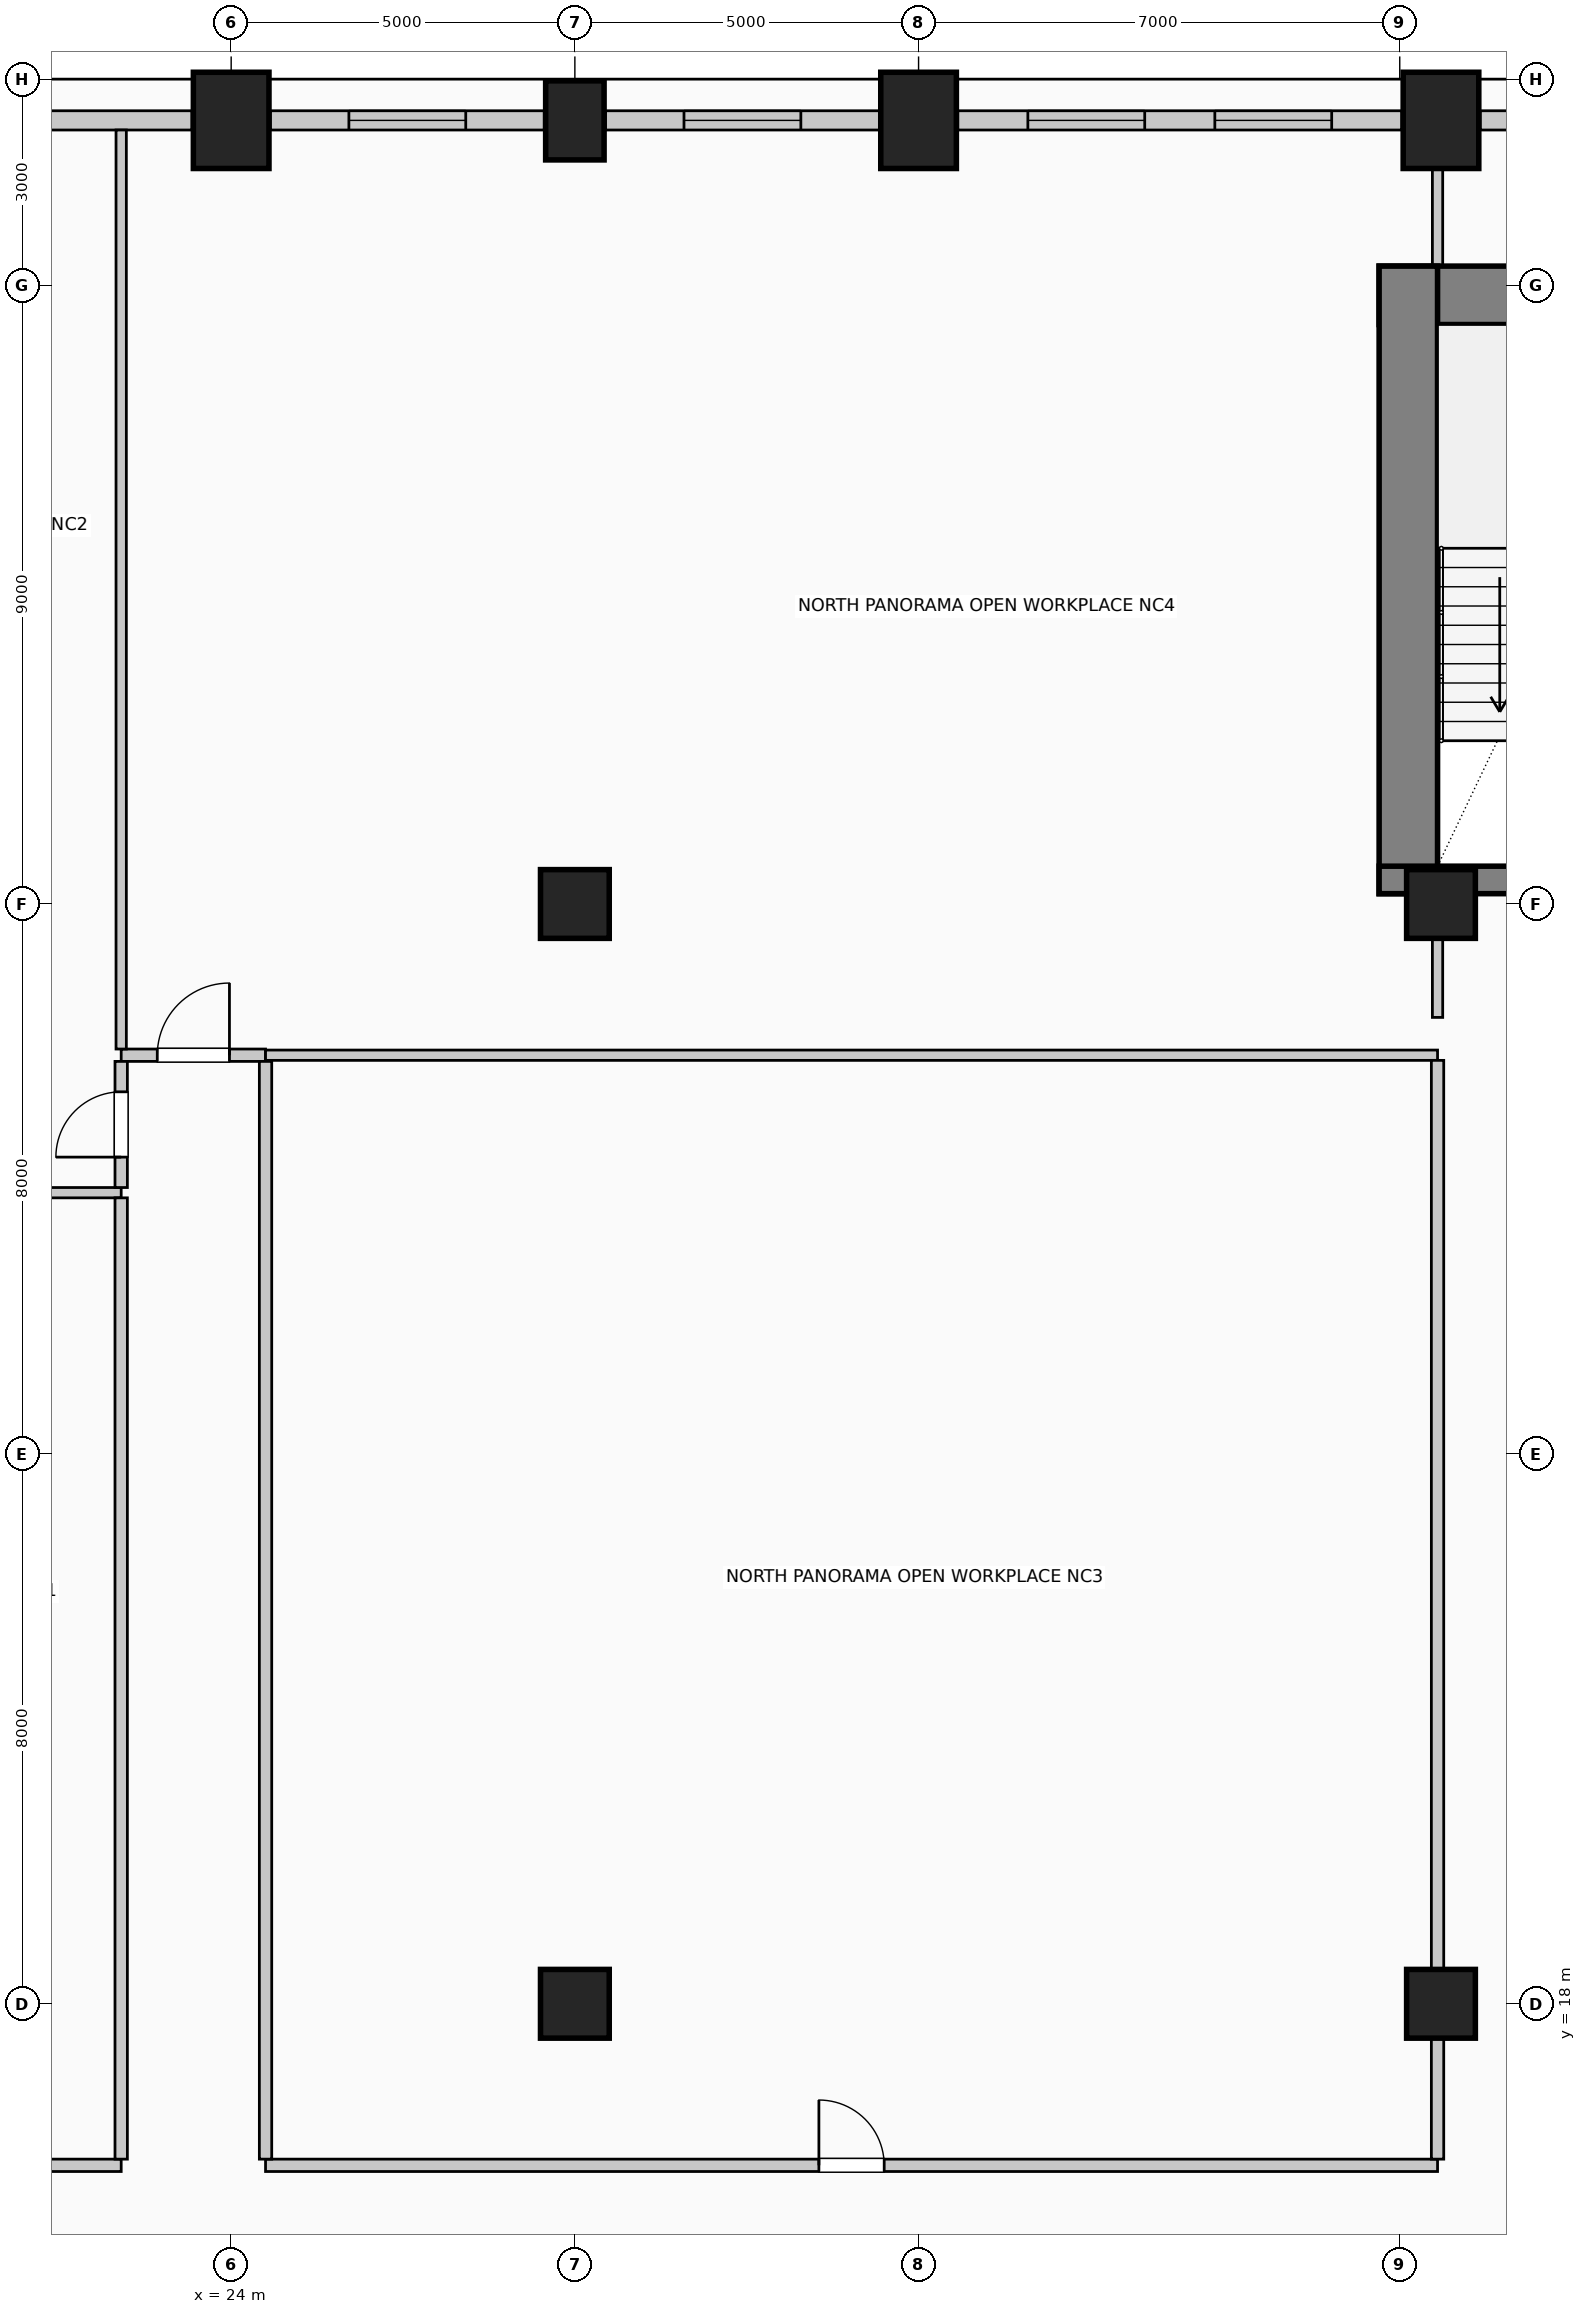
"""IFC4 building model, lengths in metres.
Left out: names, types, materials, properties, quantities, classifications, styles, units other than length and angle.
Written with IfcOpenShell. Run it as: python <this file> out.ifc"""

import sys

from ifc_helpers import new_model, si_unit, direction, frame, frame_2d, origin, origin_2d, place, context, subcontext, project, spatial, rectangle, circle, extrude, element, fill, save


model = new_model("IFC4")
c1 = context("Model", 3, precision=1e-05, world=origin(), true_north=direction((0.0, 1.0)))
c2 = subcontext(c1, "Body", "Model", "MODEL_VIEW")
j1 = project(units=[si_unit("LENGTHUNIT", "METRE"), si_unit("PLANEANGLEUNIT", "RADIAN")], contexts=[c1])
p1 = place(None, origin())
s1 = spatial("IfcSite", under=j1, at=p1, CompositionType="ELEMENT")
p2 = place(p1, origin())
s2 = spatial("IfcBuilding", under=s1, at=p2, CompositionType="ELEMENT")
p3 = place(p2, frame((0.0, 0.0, 136.6)))
s3 = spatial("IfcBuildingStorey", under=s2, at=p3, CompositionType="ELEMENT", Elevation=136.6)
p4 = place(p3, frame((40.7, 42.855, 0.0), z_axis=(0.0, 0.0, 1.0), x_axis=(1.0, 0.0, 0.0)))
e1 = element("IfcWall", 1, at=p4, inside=s3, PredefinedType="SHEAR", context=c2, shape_type="SweptSolid", body=[
    extrude(rectangle(XDim=14.6, YDim=0.85, at=frame_2d((7.3, 0.0))), origin(), (0.0, 0.0, 1.0), 4.0),
])
p5 = place(p3, frame((41.125, 34.15, 0.0), z_axis=(0.0, 0.0, 1.0), x_axis=(0.0, 1.0, 0.0)))
e2 = element("IfcWall", 2, at=p5, inside=s3, PredefinedType="SHEAR", context=c2, shape_type="SweptSolid", body=[
    extrude(rectangle(XDim=9.13, YDim=0.85, at=frame_2d((4.565, 0.0))), origin(), (0.0, 0.0, 1.0), 4.0),
])
p6 = place(p3, frame((40.7, 34.35, 0.0), z_axis=(0.0, 0.0, 1.0), x_axis=(1.0, 0.0, 0.0)))
e3 = element("IfcWall", 3, at=p6, inside=s3, PredefinedType="SHEAR", context=c2, shape_type="SweptSolid", body=[
    extrude(rectangle(XDim=5.01, YDim=0.4, at=frame_2d((2.505, 0.0))), origin(), (0.0, 0.0, 1.0), 4.0),
])
p7 = place(p6, frame((2.4, 0.0, 0.0)))
e4 = element("IfcOpeningElement", 4, at=p7, cuts=e3, PredefinedType="OPENING", context=c2, shape_type="SweptSolid", body=[
    extrude(rectangle(XDim=1.15, YDim=2.2, at=frame_2d((0.575, 1.1))), frame((0.0, 0.21, 0.0), z_axis=(0.0, -1.0, 0.0), x_axis=(1.0, 0.0, 0.0)), (0.0, 0.0, 1.0), 0.42),
])
p8 = place(p3, frame((24.0, 45.4, 0.0), z_axis=(0.0, 0.0, 1.0), x_axis=(1.0, 0.0, 0.0)))
e5 = element("IfcColumn", 5, at=p8, inside=s3, PredefinedType="COLUMN", context=c2, shape_type="SweptSolid", body=[
    extrude(rectangle(XDim=1.1, YDim=1.4, at=origin_2d()), origin(), (0.0, 0.0, 1.0), 4.0),
])
p9 = place(p3, frame((29.0, 45.4, 0.0), z_axis=(0.0, 0.0, 1.0), x_axis=(1.0, 0.0, 0.0)))
e6 = element("IfcColumn", 6, at=p9, inside=s3, PredefinedType="COLUMN", context=c2, shape_type="SweptSolid", body=[
    extrude(rectangle(XDim=0.85, YDim=1.15, at=origin_2d()), origin(), (0.0, 0.0, 1.0), 4.0),
])
for number, where, z_axis, x_axis in (
    (7, (34.0, 45.4, 0.0), (0.0, 0.0, 1.0), (1.0, 0.0, 0.0)),
    (8, (41.6, 45.4, 0.0), (0.0, 0.0, 1.0), (1.0, 0.0, 0.0)),
):
    element("IfcColumn", number, at=place(p3, frame(where, z_axis=z_axis, x_axis=x_axis)), inside=s3, PredefinedType="COLUMN", context=c2, shape_type="SweptSolid", body=[
        extrude(rectangle(XDim=1.1, YDim=1.4, at=origin_2d()), origin(), (0.0, 0.0, 1.0), 4.0),
    ])
for number, where, z_axis, x_axis in (
    (9, (29.0, 18.0, 0.0), (0.0, 0.0, 1.0), (1.0, 0.0, 0.0)),
    (10, (29.0, 34.0, 0.0), (0.0, 0.0, 1.0), (1.0, 0.0, 0.0)),
    (11, (41.6, 18.0, 0.0), (0.0, 0.0, 1.0), (1.0, 0.0, 0.0)),
    (12, (41.6, 34.0, 0.0), (0.0, 0.0, 1.0), (1.0, 0.0, 0.0)),
):
    element("IfcColumn", number, at=place(p3, frame(where, z_axis=z_axis, x_axis=x_axis)), inside=s3, PredefinedType="COLUMN", context=c2, shape_type="SweptSolid", body=[
        extrude(circle(Radius=0.5, at=origin_2d()), origin(), (0.0, 0.0, 1.0), 4.0),
    ])
p10 = place(p3, frame((16.97, 45.4, 0.0), z_axis=(0.0, 0.0, 1.0), x_axis=(1.0, 0.0, 0.0)))
e13 = element("IfcWall", 13, at=p10, inside=s3, PredefinedType="SOLIDWALL", context=c2, shape_type="SweptSolid", body=[
    extrude(rectangle(XDim=6.46, YDim=0.28, at=frame_2d((3.23, 0.0))), origin(), (0.0, 0.0, 1.0), 2.875),
])
p11 = place(p10, frame((1.02, 0.0, 0.5)))
e14 = element("IfcOpeningElement", 14, at=p11, cuts=e13, PredefinedType="OPENING", context=c2, shape_type="SweptSolid", body=[
    extrude(rectangle(XDim=1.7, YDim=1.95, at=frame_2d((0.85, 0.975))), frame((0.0, 0.15, 0.0), z_axis=(0.0, -1.0, 0.0), x_axis=(1.0, 0.0, 0.0)), (0.0, 0.0, 1.0), 0.3),
])
p12 = place(p3, frame((24.57, 45.4, 0.0), z_axis=(0.0, 0.0, 1.0), x_axis=(1.0, 0.0, 0.0)))
e15 = element("IfcWall", 15, at=p12, inside=s3, PredefinedType="SOLIDWALL", context=c2, shape_type="SweptSolid", body=[
    extrude(rectangle(XDim=3.985, YDim=0.28, at=frame_2d((1.992, 0.0))), origin(), (0.0, 0.0, 1.0), 2.875),
])
p13 = place(p12, frame((1.143, 0.0, 0.5)))
e16 = element("IfcOpeningElement", 16, at=p13, cuts=e15, PredefinedType="OPENING", context=c2, shape_type="SweptSolid", body=[
    extrude(rectangle(XDim=1.7, YDim=1.95, at=frame_2d((0.85, 0.975))), frame((0.0, 0.15, 0.0), z_axis=(0.0, -1.0, 0.0), x_axis=(1.0, 0.0, 0.0)), (0.0, 0.0, 1.0), 0.3),
])
p14 = place(p3, frame((29.445, 45.4, 0.0), z_axis=(0.0, 0.0, 1.0), x_axis=(1.0, 0.0, 0.0)))
e17 = element("IfcWall", 17, at=p14, inside=s3, PredefinedType="SOLIDWALL", context=c2, shape_type="SweptSolid", body=[
    extrude(rectangle(XDim=3.985, YDim=0.28, at=frame_2d((1.992, 0.0))), origin(), (0.0, 0.0, 1.0), 2.875),
])
p15 = place(p14, frame((1.143, 0.0, 0.5)))
e18 = element("IfcOpeningElement", 18, at=p15, cuts=e17, PredefinedType="OPENING", context=c2, shape_type="SweptSolid", body=[
    extrude(rectangle(XDim=1.7, YDim=1.95, at=frame_2d((0.85, 0.975))), frame((0.0, 0.15, 0.0), z_axis=(0.0, -1.0, 0.0), x_axis=(1.0, 0.0, 0.0)), (0.0, 0.0, 1.0), 0.3),
])
p16 = place(p3, frame((34.57, 45.4, 0.0), z_axis=(0.0, 0.0, 1.0), x_axis=(1.0, 0.0, 0.0)))
e19 = element("IfcWall", 19, at=p16, inside=s3, PredefinedType="SOLIDWALL", context=c2, shape_type="SweptSolid", body=[
    extrude(rectangle(XDim=6.46, YDim=0.28, at=frame_2d((3.23, 0.0))), origin(), (0.0, 0.0, 1.0), 2.875),
])
p17 = place(p16, frame((1.02, 0.0, 0.5)))
e20 = element("IfcOpeningElement", 20, at=p17, cuts=e19, PredefinedType="OPENING", context=c2, shape_type="SweptSolid", body=[
    extrude(rectangle(XDim=1.7, YDim=1.95, at=frame_2d((0.85, 0.975))), frame((0.0, 0.15, 0.0), z_axis=(0.0, -1.0, 0.0), x_axis=(1.0, 0.0, 0.0)), (0.0, 0.0, 1.0), 0.3),
])
p18 = place(p16, frame((3.74, 0.0, 0.5)))
e21 = element("IfcOpeningElement", 21, at=p18, cuts=e19, PredefinedType="OPENING", context=c2, shape_type="SweptSolid", body=[
    extrude(rectangle(XDim=1.7, YDim=1.95, at=frame_2d((0.85, 0.975))), frame((0.0, 0.15, 0.0), z_axis=(0.0, -1.0, 0.0), x_axis=(1.0, 0.0, 0.0)), (0.0, 0.0, 1.0), 0.3),
])
p19 = place(p3, frame((42.17, 45.4, 0.0), z_axis=(0.0, 0.0, 1.0), x_axis=(1.0, 0.0, 0.0)))
e22 = element("IfcWall", 22, at=p19, inside=s3, PredefinedType="SOLIDWALL", context=c2, shape_type="SweptSolid", body=[
    extrude(rectangle(XDim=1.385, YDim=0.28, at=frame_2d((0.692, 0.0))), origin(), (0.0, 0.0, 1.0), 2.875),
])
p20 = place(p3, frame((16.65, 15.65, 0.0), z_axis=(0.0, 0.0, 1.0), x_axis=(1.0, 0.0, 0.0)))
e23 = element("IfcWall", 23, at=p20, inside=s3, PredefinedType="PARTITIONING", context=c2, shape_type="SweptSolid", body=[
    extrude(rectangle(XDim=5.75, YDim=0.18, at=frame_2d((2.875, 0.0))), origin(), (0.0, 0.0, 1.0), 3.725),
])
p21 = place(p20, frame((2.35, 0.0, 0.0)))
e24 = element("IfcOpeningElement", 24, at=p21, cuts=e23, PredefinedType="OPENING", context=c2, shape_type="SweptSolid", body=[
    extrude(rectangle(XDim=1.05, YDim=2.15, at=frame_2d((0.525, 1.075))), frame((0.0, 0.1, 0.0), z_axis=(0.0, -1.0, 0.0), x_axis=(1.0, 0.0, 0.0)), (0.0, 0.0, 1.0), 0.2),
])
p22 = place(p3, frame((24.5, 15.65, 0.0), z_axis=(0.0, 0.0, 1.0), x_axis=(1.0, 0.0, 0.0)))
e25 = element("IfcWall", 25, at=p22, inside=s3, PredefinedType="PARTITIONING", context=c2, shape_type="SweptSolid", body=[
    extrude(rectangle(XDim=17.05, YDim=0.18, at=frame_2d((8.525, 0.0))), origin(), (0.0, 0.0, 1.0), 3.725),
])
p23 = place(p22, frame((8.05, 0.0, 0.0)))
e26 = element("IfcOpeningElement", 26, at=p23, cuts=e25, PredefinedType="OPENING", context=c2, shape_type="SweptSolid", body=[
    extrude(rectangle(XDim=0.95, YDim=2.15, at=frame_2d((0.475, 1.075))), frame((0.0, 0.1, 0.0), z_axis=(0.0, -1.0, 0.0), x_axis=(1.0, 0.0, 0.0)), (0.0, 0.0, 1.0), 0.2),
])
p24 = place(p3, frame((16.65, 29.8, 0.0), z_axis=(0.0, 0.0, 1.0), x_axis=(1.0, 0.0, 0.0)))
e27 = element("IfcWall", 27, at=p24, inside=s3, PredefinedType="PARTITIONING", context=c2, shape_type="SweptSolid", body=[
    extrude(rectangle(XDim=5.75, YDim=0.15, at=frame_2d((2.875, 0.0))), origin(), (0.0, 0.0, 1.0), 3.725),
])
p25 = place(p3, frame((22.4, 31.8, 0.0), z_axis=(0.0, 0.0, 1.0), x_axis=(1.0, 0.0, 0.0)))
e28 = element("IfcWall", 28, at=p25, inside=s3, PredefinedType="PARTITIONING", context=c2, shape_type="SweptSolid", body=[
    extrude(rectangle(XDim=2.1, YDim=0.18, at=frame_2d((1.05, 0.0))), origin(), (0.0, 0.0, 1.0), 3.725),
])
p26 = place(p25, frame((0.525, 0.0, 0.0)))
e29 = element("IfcOpeningElement", 29, at=p26, cuts=e28, PredefinedType="OPENING", context=c2, shape_type="SweptSolid", body=[
    extrude(rectangle(XDim=1.05, YDim=2.15, at=frame_2d((0.525, 1.075))), frame((0.0, 0.1, 0.0), z_axis=(0.0, -1.0, 0.0), x_axis=(1.0, 0.0, 0.0)), (0.0, 0.0, 1.0), 0.2),
])
p27 = place(p3, frame((24.5, 31.8, 0.0), z_axis=(0.0, 0.0, 1.0), x_axis=(1.0, 0.0, 0.0)))
e30 = element("IfcWall", 30, at=p27, inside=s3, PredefinedType="PARTITIONING", context=c2, shape_type="SweptSolid", body=[
    extrude(rectangle(XDim=17.05, YDim=0.15, at=frame_2d((8.525, 0.0))), origin(), (0.0, 0.0, 1.0), 3.725),
])
p28 = place(p3, frame((22.4, 15.74, 0.0), z_axis=(0.0, 0.0, 1.0), x_axis=(0.0, 1.0, 0.0)))
e31 = element("IfcWall", 31, at=p28, inside=s3, PredefinedType="PARTITIONING", context=c2, shape_type="SweptSolid", body=[
    extrude(rectangle(XDim=13.985, YDim=0.18, at=frame_2d((6.993, 0.0))), origin(), (0.0, 0.0, 1.0), 3.725),
])
p29 = place(p3, frame((22.4, 29.875, 0.0), z_axis=(0.0, 0.0, 1.0), x_axis=(0.0, 1.0, 0.0)))
e32 = element("IfcWall", 32, at=p29, inside=s3, PredefinedType="PARTITIONING", context=c2, shape_type="SweptSolid", body=[
    extrude(rectangle(XDim=1.835, YDim=0.18, at=frame_2d((0.917, 0.0))), origin(), (0.0, 0.0, 1.0), 3.725),
])
p30 = place(p29, frame((0.442, 0.0, 0.0)))
e33 = element("IfcOpeningElement", 33, at=p30, cuts=e32, PredefinedType="OPENING", context=c2, shape_type="SweptSolid", body=[
    extrude(rectangle(XDim=0.95, YDim=2.15, at=frame_2d((0.475, 1.075))), frame((0.0, 0.1, 0.0), z_axis=(0.0, -1.0, 0.0), x_axis=(1.0, 0.0, 0.0)), (0.0, 0.0, 1.0), 0.2),
])
p31 = place(p3, frame((22.4, 31.89, 0.0), z_axis=(0.0, 0.0, 1.0), x_axis=(0.0, 1.0, 0.0)))
e34 = element("IfcWall", 34, at=p31, inside=s3, PredefinedType="PARTITIONING", context=c2, shape_type="SweptSolid", body=[
    extrude(rectangle(XDim=13.37, YDim=0.15, at=frame_2d((6.685, 0.0))), origin(), (0.0, 0.0, 1.0), 3.725),
])
p32 = place(p3, frame((24.5, 15.74, 0.0), z_axis=(0.0, 0.0, 1.0), x_axis=(0.0, 1.0, 0.0)))
e35 = element("IfcWall", 35, at=p32, inside=s3, PredefinedType="PARTITIONING", context=c2, shape_type="SweptSolid", body=[
    extrude(rectangle(XDim=15.97, YDim=0.18, at=frame_2d((7.985, 0.0))), origin(), (0.0, 0.0, 1.0), 3.725),
])
p33 = place(p3, frame((41.55, 15.74, 0.0), z_axis=(0.0, 0.0, 1.0), x_axis=(0.0, 1.0, 0.0)))
e36 = element("IfcWall", 36, at=p33, inside=s3, PredefinedType="PARTITIONING", context=c2, shape_type="SweptSolid", body=[
    extrude(rectangle(XDim=1.76, YDim=0.18, at=frame_2d((0.88, 0.0))), origin(), (0.0, 0.0, 1.0), 3.07),
])
p34 = place(p3, frame((41.55, 18.5, 0.0), z_axis=(0.0, 0.0, 1.0), x_axis=(0.0, 1.0, 0.0)))
e37 = element("IfcWall", 37, at=p34, inside=s3, PredefinedType="PARTITIONING", context=c2, shape_type="SweptSolid", body=[
    extrude(rectangle(XDim=13.225, YDim=0.18, at=frame_2d((6.613, 0.0))), origin(), (0.0, 0.0, 1.0), 3.07),
])
p35 = place(p3, frame((41.55, 32.35, 0.0), z_axis=(0.0, 0.0, 1.0), x_axis=(0.0, 1.0, 0.0)))
e38 = element("IfcWall", 38, at=p35, inside=s3, PredefinedType="PARTITIONING", context=c2, shape_type="SweptSolid", body=[
    extrude(rectangle(XDim=1.15, YDim=0.15, at=frame_2d((0.575, 0.0))), origin(), (0.0, 0.0, 1.0), 3.07),
])
p36 = place(p3, frame((41.55, 43.28, 0.0), z_axis=(0.0, 0.0, 1.0), x_axis=(0.0, 1.0, 0.0)))
e39 = element("IfcWall", 39, at=p36, inside=s3, PredefinedType="PARTITIONING", context=c2, shape_type="SweptSolid", body=[
    extrude(rectangle(XDim=1.42, YDim=0.15, at=frame_2d((0.71, 0.0))), origin(), (0.0, 0.0, 1.0), 3.725),
])
p37 = place(p13, origin())
e40 = element("IfcWindow", 40, at=p37, inside=s3, PartitioningType="SINGLE_PANEL", PredefinedType="WINDOW", context=c2, shape_type="SweptSolid", body=[
    extrude(rectangle(XDim=1.7, YDim=1.95, at=frame_2d((0.85, 0.975))), frame((0.0, 0.03, 0.0), z_axis=(0.0, -1.0, 0.0), x_axis=(1.0, 0.0, 0.0)), (0.0, 0.0, 1.0), 0.06),
])
fill(e16, e40)
p38 = place(p15, origin())
e41 = element("IfcWindow", 41, at=p38, inside=s3, PartitioningType="SINGLE_PANEL", PredefinedType="WINDOW", context=c2, shape_type="SweptSolid", body=[
    extrude(rectangle(XDim=1.7, YDim=1.95, at=frame_2d((0.85, 0.975))), frame((0.0, 0.03, 0.0), z_axis=(0.0, -1.0, 0.0), x_axis=(1.0, 0.0, 0.0)), (0.0, 0.0, 1.0), 0.06),
])
fill(e18, e41)
p39 = place(p17, origin())
e42 = element("IfcWindow", 42, at=p39, inside=s3, PartitioningType="SINGLE_PANEL", PredefinedType="WINDOW", context=c2, shape_type="SweptSolid", body=[
    extrude(rectangle(XDim=1.7, YDim=1.95, at=frame_2d((0.85, 0.975))), frame((0.0, 0.03, 0.0), z_axis=(0.0, -1.0, 0.0), x_axis=(1.0, 0.0, 0.0)), (0.0, 0.0, 1.0), 0.06),
])
fill(e20, e42)
p40 = place(p18, origin())
e43 = element("IfcWindow", 43, at=p40, inside=s3, PartitioningType="SINGLE_PANEL", PredefinedType="WINDOW", context=c2, shape_type="SweptSolid", body=[
    extrude(rectangle(XDim=1.7, YDim=1.95, at=frame_2d((0.85, 0.975))), frame((0.0, 0.03, 0.0), z_axis=(0.0, -1.0, 0.0), x_axis=(1.0, 0.0, 0.0)), (0.0, 0.0, 1.0), 0.06),
])
fill(e21, e43)
p41 = place(p23, origin())
e44 = element("IfcDoor", 44, at=p41, inside=s3, OperationType="SINGLE_SWING_LEFT", PredefinedType="DOOR", context=c2, shape_type="SweptSolid", body=[
    extrude(rectangle(XDim=0.95, YDim=2.15, at=frame_2d((0.475, 1.075))), frame((0.0, 0.025, 0.0), z_axis=(0.0, -1.0, 0.0), x_axis=(1.0, 0.0, 0.0)), (0.0, 0.0, 1.0), 0.05),
])
fill(e26, e44)
p42 = place(p26, origin())
e45 = element("IfcDoor", 45, at=p42, inside=s3, OperationType="SINGLE_SWING_RIGHT", PredefinedType="DOOR", context=c2, shape_type="SweptSolid", body=[
    extrude(rectangle(XDim=1.05, YDim=2.15, at=frame_2d((0.525, 1.075))), frame((0.0, 0.025, 0.0), z_axis=(0.0, -1.0, 0.0), x_axis=(1.0, 0.0, 0.0)), (0.0, 0.0, 1.0), 0.05),
])
fill(e29, e45)
p43 = place(p30, origin())
e46 = element("IfcDoor", 46, at=p43, inside=s3, OperationType="SINGLE_SWING_LEFT", PredefinedType="DOOR", context=c2, shape_type="SweptSolid", body=[
    extrude(rectangle(XDim=0.95, YDim=2.15, at=frame_2d((0.475, 1.075))), frame((0.0, 0.025, 0.0), z_axis=(0.0, -1.0, 0.0), x_axis=(1.0, 0.0, 0.0)), (0.0, 0.0, 1.0), 0.05),
])
fill(e33, e46)
save(model, sys.argv[1])
